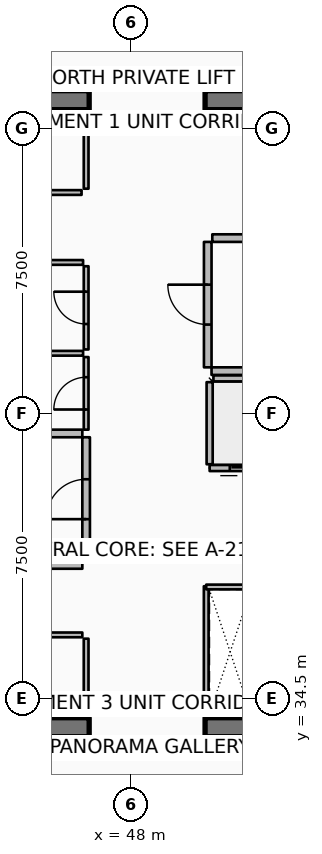
"""IFC4 building model, lengths in metres.
Left out: names, types, materials, properties, quantities, classifications, styles, units other than length and angle.
Written with IfcOpenShell. Run it as: python <this file> out.ifc"""

import sys

from ifc_helpers import new_model, si_unit, direction, frame, frame_2d, origin, place, context, subcontext, project, spatial, rectangle, extrude, element, fill, save


model = new_model("IFC4")
c1 = context("Model", 3, precision=1e-05, world=origin(), true_north=direction((0.0, 1.0)))
c2 = subcontext(c1, "Body", "Model", "MODEL_VIEW")
j1 = project(units=[si_unit("LENGTHUNIT", "METRE"), si_unit("PLANEANGLEUNIT", "RADIAN")], contexts=[c1])
p1 = place(None, origin())
s1 = spatial("IfcSite", under=j1, at=p1, CompositionType="ELEMENT")
p2 = place(p1, origin())
s2 = spatial("IfcBuilding", under=s1, at=p2, CompositionType="ELEMENT")
p3 = place(p2, frame((0.0, 0.0, 309.85)))
s3 = spatial("IfcBuildingStorey", under=s2, at=p3, CompositionType="ELEMENT", Elevation=309.85)
p4 = place(p3, frame((37.3, 33.75, 0.0), z_axis=(0.0, 0.0, 1.0), x_axis=(1.0, 0.0, 0.0)))
e1 = element("IfcWall", 1, at=p4, inside=s3, PredefinedType="SHEAR", context=c2, shape_type="SweptSolid", body=[
    extrude(rectangle(XDim=9.6, YDim=0.5, at=frame_2d((4.8, 0.0))), origin(), (0.0, 0.0, 1.0), 3.85),
])
p5 = place(p3, frame((49.95, 33.75, 0.0), z_axis=(0.0, 0.0, 1.0), x_axis=(1.0, 0.0, 0.0)))
e2 = element("IfcWall", 2, at=p5, inside=s3, PredefinedType="SHEAR", context=c2, shape_type="SweptSolid", body=[
    extrude(rectangle(XDim=9.6, YDim=0.5, at=frame_2d((4.8, 0.0))), origin(), (0.0, 0.0, 1.0), 3.85),
])
p6 = place(p3, frame((37.3, 50.25, 0.0), z_axis=(0.0, 0.0, 1.0), x_axis=(1.0, 0.0, 0.0)))
e3 = element("IfcWall", 3, at=p6, inside=s3, PredefinedType="SHEAR", context=c2, shape_type="SweptSolid", body=[
    extrude(rectangle(XDim=9.6, YDim=0.5, at=frame_2d((4.8, 0.0))), origin(), (0.0, 0.0, 1.0), 3.85),
])
p7 = place(p3, frame((49.95, 50.25, 0.0), z_axis=(0.0, 0.0, 1.0), x_axis=(1.0, 0.0, 0.0)))
e4 = element("IfcWall", 4, at=p7, inside=s3, PredefinedType="SHEAR", context=c2, shape_type="SweptSolid", body=[
    extrude(rectangle(XDim=9.6, YDim=0.5, at=frame_2d((4.8, 0.0))), origin(), (0.0, 0.0, 1.0), 3.85),
])
p8 = place(p3, frame((52.23, 40.57, 0.0), z_axis=(0.0, 0.0, 1.0), x_axis=(-1.0, 0.0, 0.0)))
e5 = element("IfcWall", 5, at=p8, inside=s3, PredefinedType="PARTITIONING", context=c2, shape_type="SweptSolid", body=[
    extrude(rectangle(XDim=2.16, YDim=0.16, at=frame_2d((1.08, 0.0))), origin(), (0.0, 0.0, 1.0), 3.45),
])
p9 = place(p8, frame((0.53, 0.0, 0.0)))
e6 = element("IfcOpeningElement", 6, at=p9, cuts=e5, PredefinedType="OPENING", context=c2, shape_type="SweptSolid", body=[
    extrude(rectangle(XDim=1.1, YDim=2.1, at=frame_2d((0.55, 1.05))), frame((0.0, 0.09, 0.0), z_axis=(0.0, -1.0, 0.0), x_axis=(1.0, 0.0, 0.0)), (0.0, 0.0, 1.0), 0.18),
])
p10 = place(p3, frame((50.07, 40.67, 0.0), z_axis=(0.0, 0.0, 1.0), x_axis=(0.0, 1.0, 0.0)))
e7 = element("IfcWall", 7, at=p10, inside=s3, PredefinedType="PARTITIONING", context=c2, shape_type="SweptSolid", body=[
    extrude(rectangle(XDim=2.16, YDim=0.16, at=frame_2d((1.08, 0.0))), origin(), (0.0, 0.0, 1.0), 3.45),
])
p11 = place(p3, frame((50.17, 42.93, 0.0), z_axis=(0.0, 0.0, 1.0), x_axis=(1.0, 0.0, 0.0)))
e8 = element("IfcWall", 8, at=p11, inside=s3, PredefinedType="PARTITIONING", context=c2, shape_type="SweptSolid", body=[
    extrude(rectangle(XDim=1.96, YDim=0.16, at=frame_2d((0.98, 0.0))), origin(), (0.0, 0.0, 1.0), 3.45),
])
p12 = place(p3, frame((46.82, 34.05, 0.0), z_axis=(0.0, 0.0, 1.0), x_axis=(0.0, 1.0, 0.0)))
e9 = element("IfcWall", 9, at=p12, inside=s3, PredefinedType="PARTITIONING", context=c2, shape_type="SweptSolid", body=[
    extrude(rectangle(XDim=2.03, YDim=0.125, at=frame_2d((1.015, 0.0))), origin(), (0.0, 0.0, 1.0), 2.89),
])
p13 = place(p3, frame((37.92, 36.18, 0.0), z_axis=(0.0, 0.0, 1.0), x_axis=(1.0, 0.0, 0.0)))
e10 = element("IfcWall", 10, at=p13, inside=s3, PredefinedType="PARTITIONING", context=c2, shape_type="SweptSolid", body=[
    extrude(rectangle(XDim=8.8, YDim=0.125, at=frame_2d((4.4, 0.0))), origin(), (0.0, 0.0, 1.0), 2.89),
])
p14 = place(p13, frame((3.975, 0.0, 0.0)))
e11 = element("IfcOpeningElement", 11, at=p14, cuts=e10, PredefinedType="OPENING", context=c2, shape_type="SweptSolid", body=[
    extrude(rectangle(XDim=0.85, YDim=2.06, at=frame_2d((0.425, 1.03))), frame((0.0, 0.073, 0.0), z_axis=(0.0, -1.0, 0.0), x_axis=(1.0, 0.0, 0.0)), (0.0, 0.0, 1.0), 0.145),
])
p15 = place(p3, frame((46.82, 47.92, 0.0), z_axis=(0.0, 0.0, 1.0), x_axis=(0.0, 1.0, 0.0)))
e12 = element("IfcWall", 12, at=p15, inside=s3, PredefinedType="PARTITIONING", context=c2, shape_type="SweptSolid", body=[
    extrude(rectangle(XDim=2.03, YDim=0.125, at=frame_2d((1.015, 0.0))), origin(), (0.0, 0.0, 1.0), 2.89),
])
p16 = place(p3, frame((42.2, 47.82, 0.0), z_axis=(0.0, 0.0, 1.0), x_axis=(1.0, 0.0, 0.0)))
e13 = element("IfcWall", 13, at=p16, inside=s3, PredefinedType="PARTITIONING", context=c2, shape_type="SweptSolid", body=[
    extrude(rectangle(XDim=4.5, YDim=0.125, at=frame_2d((2.25, 0.0))), origin(), (0.0, 0.0, 1.0), 2.89),
])
p17 = place(p16, frame((1.825, 0.0, 0.0)))
e14 = element("IfcOpeningElement", 14, at=p17, cuts=e13, PredefinedType="OPENING", context=c2, shape_type="SweptSolid", body=[
    extrude(rectangle(XDim=0.85, YDim=2.06, at=frame_2d((0.425, 1.03))), frame((0.0, 0.073, 0.0), z_axis=(0.0, -1.0, 0.0), x_axis=(1.0, 0.0, 0.0)), (0.0, 0.0, 1.0), 0.145),
])
p18 = place(p3, frame((41.35, 38.02, 0.0), z_axis=(0.0, 0.0, 1.0), x_axis=(1.0, 0.0, 0.0)))
e15 = element("IfcWall", 15, at=p18, inside=s3, PredefinedType="PARTITIONING", context=c2, shape_type="SweptSolid", body=[
    extrude(rectangle(XDim=5.37, YDim=0.2, at=frame_2d((2.685, 0.0))), origin(), (0.0, 0.0, 1.0), 3.45),
])
p19 = place(p3, frame((43.92, 41.48, 0.0), z_axis=(0.0, 0.0, 1.0), x_axis=(1.0, 0.0, 0.0)))
e16 = element("IfcWall", 16, at=p19, inside=s3, PredefinedType="PARTITIONING", context=c2, shape_type="SweptSolid", body=[
    extrude(rectangle(XDim=2.8, YDim=0.2, at=frame_2d((1.4, 0.0))), origin(), (0.0, 0.0, 1.0), 3.45),
])
p20 = place(p3, frame((46.82, 38.12, 0.0), z_axis=(0.0, 0.0, 1.0), x_axis=(0.0, 1.0, 0.0)))
e17 = element("IfcWall", 17, at=p20, inside=s3, PredefinedType="PARTITIONING", context=c2, shape_type="SweptSolid", body=[
    extrude(rectangle(XDim=3.26, YDim=0.2, at=frame_2d((1.63, 0.0))), origin(), (0.0, 0.0, 1.0), 3.45),
])
p21 = place(p20, frame((1.105, 0.0, 0.0)))
e18 = element("IfcOpeningElement", 18, at=p21, cuts=e17, PredefinedType="OPENING", context=c2, shape_type="SweptSolid", body=[
    extrude(rectangle(XDim=1.05, YDim=2.1, at=frame_2d((0.525, 1.05))), frame((0.0, 0.11, 0.0), z_axis=(0.0, -1.0, 0.0), x_axis=(1.0, 0.0, 0.0)), (0.0, 0.0, 1.0), 0.22),
])
p22 = place(p3, frame((50.12, 43.12, 0.0), z_axis=(0.0, 0.0, 1.0), x_axis=(1.0, 0.0, 0.0)))
e19 = element("IfcWall", 19, at=p22, inside=s3, PredefinedType="PARTITIONING", context=c2, shape_type="SweptSolid", body=[
    extrude(rectangle(XDim=8.88, YDim=0.2, at=frame_2d((4.44, 0.0))), origin(), (0.0, 0.0, 1.0), 3.45),
])
p23 = place(p3, frame((50.14, 46.62, 0.0), z_axis=(0.0, 0.0, 1.0), x_axis=(1.0, 0.0, 0.0)))
e20 = element("IfcWall", 20, at=p23, inside=s3, PredefinedType="PARTITIONING", context=c2, shape_type="SweptSolid", body=[
    extrude(rectangle(XDim=1.02, YDim=0.2, at=frame_2d((0.51, 0.0))), origin(), (0.0, 0.0, 1.0), 3.45),
])
p24 = place(p3, frame((50.02, 43.22, 0.0), z_axis=(0.0, 0.0, 1.0), x_axis=(0.0, 1.0, 0.0)))
e21 = element("IfcWall", 21, at=p24, inside=s3, PredefinedType="PARTITIONING", context=c2, shape_type="SweptSolid", body=[
    extrude(rectangle(XDim=3.3, YDim=0.2, at=frame_2d((1.65, 0.0))), origin(), (0.0, 0.0, 1.0), 3.45),
])
p25 = place(p24, frame((1.125, 0.0, 0.0)))
e22 = element("IfcOpeningElement", 22, at=p25, cuts=e21, PredefinedType="OPENING", context=c2, shape_type="SweptSolid", body=[
    extrude(rectangle(XDim=1.05, YDim=2.1, at=frame_2d((0.525, 1.05))), frame((0.0, 0.11, 0.0), z_axis=(0.0, -1.0, 0.0), x_axis=(1.0, 0.0, 0.0)), (0.0, 0.0, 1.0), 0.22),
])
p26 = place(p3, frame((49.98, 34.06, 0.0), z_axis=(0.0, 0.0, 1.0), x_axis=(0.0, 1.0, 0.0)))
e23 = element("IfcWall", 23, at=p26, inside=s3, PredefinedType="PARTITIONING", context=c2, shape_type="SweptSolid", body=[
    extrude(rectangle(XDim=3.4, YDim=0.125, at=frame_2d((1.7, 0.0))), origin(), (0.0, 0.0, 1.0), 2.89),
])
p27 = place(p3, frame((49.98, 37.44, 0.0), z_axis=(0.0, 0.0, 1.0), x_axis=(1.0, 0.0, 0.0)))
e24 = element("IfcWall", 24, at=p27, inside=s3, PredefinedType="PARTITIONING", context=c2, shape_type="SweptSolid", body=[
    extrude(rectangle(XDim=1.26, YDim=0.125, at=frame_2d((0.63, 0.0))), origin(), (0.0, 0.0, 1.0), 2.89),
])
p28 = place(p3, frame((44.03, 43.59, 0.0), z_axis=(0.0, 0.0, 1.0), x_axis=(1.0, 0.0, 0.0)))
e25 = element("IfcWall", 25, at=p28, inside=s3, PredefinedType="PARTITIONING", context=c2, shape_type="SweptSolid", body=[
    extrude(rectangle(XDim=2.71, YDim=0.125, at=frame_2d((1.355, 0.0))), origin(), (0.0, 0.0, 1.0), 2.89),
])
p29 = place(p3, frame((46.82, 41.58, 0.0), z_axis=(0.0, 0.0, 1.0), x_axis=(0.0, 1.0, 0.0)))
e26 = element("IfcWall", 26, at=p29, inside=s3, PredefinedType="PARTITIONING", context=c2, shape_type="SweptSolid", body=[
    extrude(rectangle(XDim=1.91, YDim=0.125, at=frame_2d((0.955, 0.0))), origin(), (0.0, 0.0, 1.0), 2.89),
])
p30 = place(p29, frame((0.53, 0.0, 0.0)))
e27 = element("IfcOpeningElement", 27, at=p30, cuts=e26, PredefinedType="OPENING", context=c2, shape_type="SweptSolid", body=[
    extrude(rectangle(XDim=0.85, YDim=2.06, at=frame_2d((0.425, 1.03))), frame((0.0, 0.073, 0.0), z_axis=(0.0, -1.0, 0.0), x_axis=(1.0, 0.0, 0.0)), (0.0, 0.0, 1.0), 0.145),
])
p31 = place(p3, frame((46.82, 43.69, 0.0), z_axis=(0.0, 0.0, 1.0), x_axis=(0.0, 1.0, 0.0)))
e28 = element("IfcWall", 28, at=p31, inside=s3, PredefinedType="PARTITIONING", context=c2, shape_type="SweptSolid", body=[
    extrude(rectangle(XDim=2.19, YDim=0.125, at=frame_2d((1.095, 0.0))), origin(), (0.0, 0.0, 1.0), 2.89),
])
p32 = place(p31, frame((0.67, 0.0, 0.0)))
e29 = element("IfcOpeningElement", 29, at=p32, cuts=e28, PredefinedType="OPENING", context=c2, shape_type="SweptSolid", body=[
    extrude(rectangle(XDim=0.85, YDim=2.06, at=frame_2d((0.425, 1.03))), frame((0.0, 0.073, 0.0), z_axis=(0.0, -1.0, 0.0), x_axis=(1.0, 0.0, 0.0)), (0.0, 0.0, 1.0), 0.145),
])
p33 = place(p3, frame((45.48, 45.98, 0.0), z_axis=(0.0, 0.0, 1.0), x_axis=(1.0, 0.0, 0.0)))
e30 = element("IfcWall", 30, at=p33, inside=s3, PredefinedType="PARTITIONING", context=c2, shape_type="SweptSolid", body=[
    extrude(rectangle(XDim=1.26, YDim=0.125, at=frame_2d((0.63, 0.0))), origin(), (0.0, 0.0, 1.0), 2.89),
])
p34 = place(p9, origin())
e31 = element("IfcDoor", 31, at=p34, inside=s3, OperationType="DOUBLE_DOOR_SLIDING", PredefinedType="DOOR", context=c2, shape_type="SweptSolid", body=[
    extrude(rectangle(XDim=1.1, YDim=2.1, at=frame_2d((0.55, 1.05))), frame((0.0, 0.025, 0.0), z_axis=(0.0, -1.0, 0.0), x_axis=(1.0, 0.0, 0.0)), (0.0, 0.0, 1.0), 0.05),
])
fill(e6, e31)
p35 = place(p21, origin())
e32 = element("IfcDoor", 32, at=p35, inside=s3, OperationType="SINGLE_SWING_LEFT", PredefinedType="DOOR", context=c2, shape_type="SweptSolid", body=[
    extrude(rectangle(XDim=1.05, YDim=2.1, at=frame_2d((0.525, 1.05))), frame((0.0, 0.025, 0.0), z_axis=(0.0, -1.0, 0.0), x_axis=(1.0, 0.0, 0.0)), (0.0, 0.0, 1.0), 0.05),
])
fill(e18, e32)
p36 = place(p25, origin())
e33 = element("IfcDoor", 33, at=p36, inside=s3, OperationType="SINGLE_SWING_RIGHT", PredefinedType="DOOR", context=c2, shape_type="SweptSolid", body=[
    extrude(rectangle(XDim=1.05, YDim=2.1, at=frame_2d((0.525, 1.05))), frame((0.0, 0.025, 0.0), z_axis=(0.0, -1.0, 0.0), x_axis=(1.0, 0.0, 0.0)), (0.0, 0.0, 1.0), 0.05),
])
fill(e22, e33)
p37 = place(p30, origin())
e34 = element("IfcDoor", 34, at=p37, inside=s3, OperationType="SINGLE_SWING_LEFT", PredefinedType="DOOR", context=c2, shape_type="SweptSolid", body=[
    extrude(rectangle(XDim=0.85, YDim=2.06, at=frame_2d((0.425, 1.03))), frame((0.0, 0.025, 0.0), z_axis=(0.0, -1.0, 0.0), x_axis=(1.0, 0.0, 0.0)), (0.0, 0.0, 1.0), 0.05),
])
fill(e27, e34)
p38 = place(p32, origin())
e35 = element("IfcDoor", 35, at=p38, inside=s3, OperationType="SINGLE_SWING_RIGHT", PredefinedType="DOOR", context=c2, shape_type="SweptSolid", body=[
    extrude(rectangle(XDim=0.85, YDim=2.06, at=frame_2d((0.425, 1.03))), frame((0.0, 0.025, 0.0), z_axis=(0.0, -1.0, 0.0), x_axis=(1.0, 0.0, 0.0)), (0.0, 0.0, 1.0), 0.05),
])
fill(e29, e35)
save(model, sys.argv[1])
